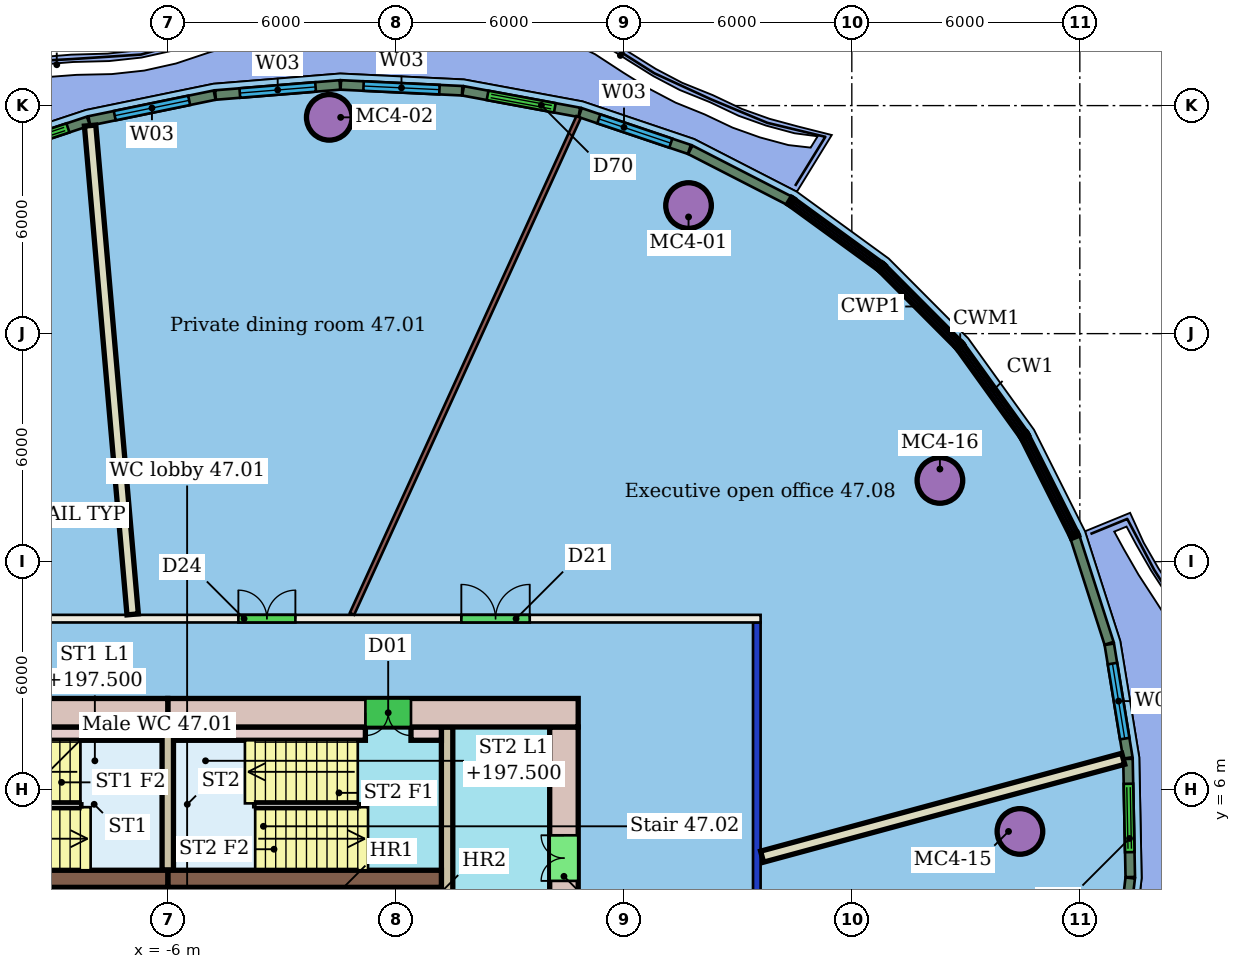
"""IFC4 building model, lengths in metres.
Left out: names, types, materials, properties, quantities, classifications, styles, units other than length and angle.
Written with IfcOpenShell. Run it as: python <this file> out.ifc"""

import sys

from ifc_helpers import new_model, si_unit, direction, frame, frame_2d, origin, origin_2d, place, context, subcontext, project, spatial, rectangle, hollow_circle, extrude, element, fill, save


model = new_model("IFC4")
c1 = context("Model", 3, precision=1e-05, world=origin(), true_north=direction((0.0, 1.0)))
c2 = subcontext(c1, "Body", "Model", "MODEL_VIEW")
j1 = project(units=[si_unit("LENGTHUNIT", "METRE"), si_unit("PLANEANGLEUNIT", "RADIAN")], contexts=[c1])
p1 = place(None, origin())
s1 = spatial("IfcSite", under=j1, at=p1, CompositionType="ELEMENT")
p2 = place(p1, origin())
s2 = spatial("IfcBuilding", under=s1, at=p2, CompositionType="ELEMENT")
p3 = place(p2, frame((0.0, 0.0, 195.7)))
s3 = spatial("IfcBuildingStorey", under=s2, at=p3, CompositionType="ELEMENT", Elevation=195.7)
for number, where, z_axis, x_axis in (
    (1, (7.704, 21.37, 0.0), (0.0, 0.0, 1.0), (1.0, 0.0, 0.0)),
    (2, (-1.75, 23.691, 0.0), (0.0, 0.0, 1.0), (1.0, 0.0, 0.0)),
    (3, (16.424, 4.901, 0.0), (0.0, 0.0, 1.0), (1.0, 0.0, 0.0)),
    (4, (14.318, 14.137, 0.0), (0.0, 0.0, 1.0), (1.0, 0.0, 0.0)),
):
    element("IfcColumn", number, at=place(p3, frame(where, z_axis=z_axis, x_axis=x_axis)), inside=s3, PredefinedType="COLUMN", context=c2, shape_type="SweptSolid", body=[
        extrude(hollow_circle(Radius=0.6, WallThickness=0.045, at=origin_2d()), origin(), (0.0, 0.0, 1.0), 3.45),
    ])
p4 = place(p3, frame((-21.6, 10.5, 0.0), z_axis=(0.0, 0.0, 1.0), x_axis=(1.0, 0.0, 0.0)))
e5 = element("IfcWall", 5, at=p4, inside=s3, PredefinedType="PARTITIONING", context=c2, shape_type="SweptSolid", body=[
    extrude(rectangle(XDim=31.2, YDim=0.2, at=frame_2d((15.6, 0.0))), origin(), (0.0, 0.0, 1.0), 3.45),
])
p5 = place(p4, frame((17.458, 0.0, 0.0)))
e6 = element("IfcOpeningElement", 6, at=p5, cuts=e5, PredefinedType="OPENING", context=c2, shape_type="SweptSolid", body=[
    extrude(rectangle(XDim=1.5, YDim=2.1, at=frame_2d((0.75, 1.05))), frame((0.0, 0.11, 0.0), z_axis=(0.0, -1.0, 0.0), x_axis=(1.0, 0.0, 0.0)), (0.0, 0.0, 1.0), 0.22),
])
p6 = place(p4, frame((8.814, 0.0, 0.0)))
e7 = element("IfcOpeningElement", 7, at=p6, cuts=e5, PredefinedType="OPENING", context=c2, shape_type="SweptSolid", body=[
    extrude(rectangle(XDim=1.8, YDim=2.4, at=frame_2d((0.9, 1.2))), frame((0.0, 0.11, 0.0), z_axis=(0.0, -1.0, 0.0), x_axis=(1.0, 0.0, 0.0)), (0.0, 0.0, 1.0), 0.22),
])
p7 = place(p4, frame((23.325, 0.0, 0.0)))
e8 = element("IfcOpeningElement", 8, at=p7, cuts=e5, PredefinedType="OPENING", context=c2, shape_type="SweptSolid", body=[
    extrude(rectangle(XDim=1.8, YDim=2.1, at=frame_2d((0.9, 1.05))), frame((0.0, 0.11, 0.0), z_axis=(0.0, -1.0, 0.0), x_axis=(1.0, 0.0, 0.0)), (0.0, 0.0, 1.0), 0.22),
])
p8 = place(p3, frame((9.5, 10.4, 0.0), z_axis=(0.0, 0.0, 1.0), x_axis=(0.0, -1.0, 0.0)))
e9 = element("IfcWall", 9, at=p8, inside=s3, PredefinedType="PARTITIONING", context=c2, shape_type="SweptSolid", body=[
    extrude(rectangle(XDim=20.8, YDim=0.2, at=frame_2d((10.4, 0.0))), origin(), (0.0, 0.0, 1.0), 3.05),
])
p9 = place(p8, frame((10.281, 0.0, 0.0)))
e10 = element("IfcOpeningElement", 10, at=p9, cuts=e9, PredefinedType="OPENING", context=c2, shape_type="SweptSolid", body=[
    extrude(rectangle(XDim=1.8, YDim=2.4, at=frame_2d((0.9, 1.2))), frame((0.0, 0.11, 0.0), z_axis=(0.0, -1.0, 0.0), x_axis=(1.0, 0.0, 0.0)), (0.0, 0.0, 1.0), 0.22),
])
p10 = place(p3, frame((4.811, 23.699, 0.0), z_axis=(0.0, 0.0, 1.0), x_axis=(-0.415026400379, -0.909809368488, 0.0)))
e11 = element("IfcWall", 11, at=p10, inside=s3, PredefinedType="PARTITIONING", context=c2, shape_type="SweptSolid", body=[
    extrude(rectangle(XDim=14.369, YDim=0.125, at=frame_2d((7.184, 0.0))), origin(), (0.0, 0.0, 1.0), 3.45),
])
p11 = place(p3, frame((-8.044, 23.474, 0.0), z_axis=(0.0, 0.0, 1.0), x_axis=(0.086744678296, -0.996230576115, 0.0)))
e12 = element("IfcWall", 12, at=p11, inside=s3, PredefinedType="PARTITIONING", context=c2, shape_type="SweptSolid", body=[
    extrude(rectangle(XDim=12.91, YDim=0.3, at=frame_2d((6.455, 0.0))), origin(), (0.0, 0.0, 1.0), 3.45),
])
p12 = place(p3, frame((19.141, 6.812, 0.0), z_axis=(0.0, 0.0, 1.0), x_axis=(-0.965195730249, -0.26152858794, 0.0)))
e13 = element("IfcWall", 13, at=p12, inside=s3, PredefinedType="PARTITIONING", context=c2, shape_type="SweptSolid", body=[
    extrude(rectangle(XDim=9.845, YDim=0.3, at=frame_2d((4.922, 0.0))), origin(), (0.0, 0.0, 1.0), 3.45),
])
p13 = place(p3, frame((10.348, 21.503, 0.0), z_axis=(0.0, 0.0, 1.0), x_axis=(-0.889595471306, 0.456749271955, 0.0)))
e14 = element("IfcWall", 14, at=p13, inside=s3, PredefinedType="SOLIDWALL", context=c2, shape_type="SweptSolid", body=[
    extrude(rectangle(XDim=2.921, YDim=0.25, at=frame_2d((1.46, 0.0))), origin(), (0.0, 0.0, 1.0), 3.1),
])
p14 = place(p3, frame((7.725, 22.847, 0.0), z_axis=(0.0, 0.0, 1.0), x_axis=(-0.947557264869, 0.319586028784, 0.0)))
e15 = element("IfcWall", 15, at=p14, inside=s3, PredefinedType="SOLIDWALL", context=c2, shape_type="SweptSolid", body=[
    extrude(rectangle(XDim=3.03, YDim=0.25, at=frame_2d((1.515, 0.0))), origin(), (0.0, 0.0, 1.0), 3.1),
])
p15 = place(p14, frame((0.515, 0.0, 0.9)))
e16 = element("IfcOpeningElement", 16, at=p15, cuts=e15, PredefinedType="OPENING", context=c2, shape_type="SweptSolid", body=[
    extrude(rectangle(XDim=2.0, YDim=2.1, at=frame_2d((1.0, 1.05))), frame((0.0, 0.135, 0.0), z_axis=(0.0, -1.0, 0.0), x_axis=(1.0, 0.0, 0.0)), (0.0, 0.0, 1.0), 0.27),
])
p16 = place(p3, frame((4.829, 23.822, 0.0), z_axis=(0.0, 0.0, 1.0), x_axis=(-0.98330230245, 0.181979619727, 0.0)))
e17 = element("IfcWall", 17, at=p16, inside=s3, PredefinedType="SOLIDWALL", context=c2, shape_type="SweptSolid", body=[
    extrude(rectangle(XDim=3.11, YDim=0.25, at=frame_2d((1.555, 0.0))), origin(), (0.0, 0.0, 1.0), 3.1),
])
p17 = place(p16, frame((0.655, 0.0, 0.0)))
e18 = element("IfcOpeningElement", 18, at=p17, cuts=e17, PredefinedType="OPENING", context=c2, shape_type="SweptSolid", body=[
    extrude(rectangle(XDim=1.8, YDim=2.4, at=frame_2d((0.9, 1.2))), frame((0.0, 0.135, 0.0), z_axis=(0.0, -1.0, 0.0), x_axis=(1.0, 0.0, 0.0)), (0.0, 0.0, 1.0), 0.27),
])
p18 = place(p3, frame((1.747, 24.391, 0.0), z_axis=(0.0, 0.0, 1.0), x_axis=(-0.998856706074, 0.047804609939, 0.0)))
e19 = element("IfcWall", 19, at=p18, inside=s3, PredefinedType="SOLIDWALL", context=c2, shape_type="SweptSolid", body=[
    extrude(rectangle(XDim=3.197, YDim=0.25, at=frame_2d((1.599, 0.0))), origin(), (0.0, 0.0, 1.0), 3.1),
])
p19 = place(p18, frame((0.598, 0.0, 0.9)))
e20 = element("IfcOpeningElement", 20, at=p19, cuts=e19, PredefinedType="OPENING", context=c2, shape_type="SweptSolid", body=[
    extrude(rectangle(XDim=2.0, YDim=2.1, at=frame_2d((1.0, 1.05))), frame((0.0, 0.135, 0.0), z_axis=(0.0, -1.0, 0.0), x_axis=(1.0, 0.0, 0.0)), (0.0, 0.0, 1.0), 0.27),
])
p20 = place(p3, frame((-1.471, 24.543, 0.0), z_axis=(0.0, 0.0, 1.0), x_axis=(-0.996754245235, -0.080504500529, 0.0)))
e21 = element("IfcWall", 21, at=p20, inside=s3, PredefinedType="SOLIDWALL", context=c2, shape_type="SweptSolid", body=[
    extrude(rectangle(XDim=3.284, YDim=0.25, at=frame_2d((1.642, 0.0))), origin(), (0.0, 0.0, 1.0), 3.1),
])
p21 = place(p20, frame((0.642, 0.0, 0.9)))
e22 = element("IfcOpeningElement", 22, at=p21, cuts=e21, PredefinedType="OPENING", context=c2, shape_type="SweptSolid", body=[
    extrude(rectangle(XDim=2.0, YDim=2.1, at=frame_2d((1.0, 1.05))), frame((0.0, 0.135, 0.0), z_axis=(0.0, -1.0, 0.0), x_axis=(1.0, 0.0, 0.0)), (0.0, 0.0, 1.0), 0.27),
])
p22 = place(p3, frame((-4.767, 24.276, 0.0), z_axis=(0.0, 0.0, 1.0), x_axis=(-0.979500828614, -0.201440131914, 0.0)))
e23 = element("IfcWall", 23, at=p22, inside=s3, PredefinedType="SOLIDWALL", context=c2, shape_type="SweptSolid", body=[
    extrude(rectangle(XDim=3.367, YDim=0.25, at=frame_2d((1.684, 0.0))), origin(), (0.0, 0.0, 1.0), 3.1),
])
p23 = place(p22, frame((0.683, 0.0, 0.9)))
e24 = element("IfcOpeningElement", 24, at=p23, cuts=e23, PredefinedType="OPENING", context=c2, shape_type="SweptSolid", body=[
    extrude(rectangle(XDim=2.0, YDim=2.1, at=frame_2d((1.0, 1.05))), frame((0.0, 0.135, 0.0), z_axis=(0.0, -1.0, 0.0), x_axis=(1.0, 0.0, 0.0)), (0.0, 0.0, 1.0), 0.27),
])
p24 = place(p3, frame((-8.087, 23.592, 0.0), z_axis=(0.0, 0.0, 1.0), x_axis=(-0.949348540896, -0.314224995663, 0.0)))
e25 = element("IfcWall", 25, at=p24, inside=s3, PredefinedType="SOLIDWALL", context=c2, shape_type="SweptSolid", body=[
    extrude(rectangle(XDim=3.439, YDim=0.25, at=frame_2d((1.719, 0.0))), origin(), (0.0, 0.0, 1.0), 3.1),
])
p25 = place(p24, frame((0.569, 0.0, 0.0)))
e26 = element("IfcOpeningElement", 26, at=p25, cuts=e25, PredefinedType="OPENING", context=c2, shape_type="SweptSolid", body=[
    extrude(rectangle(XDim=1.8, YDim=2.4, at=frame_2d((0.9, 1.2))), frame((0.0, 0.135, 0.0), z_axis=(0.0, -1.0, 0.0), x_axis=(1.0, 0.0, 0.0)), (0.0, 0.0, 1.0), 0.27),
])
p26 = place(p3, frame((18.958, 0.501, 0.0), z_axis=(0.0, 0.0, 1.0), x_axis=(0.115316862034, 0.99332875793, 0.0)))
e27 = element("IfcWall", 27, at=p26, inside=s3, PredefinedType="SOLIDWALL", context=c2, shape_type="SweptSolid", body=[
    extrude(rectangle(XDim=3.197, YDim=0.25, at=frame_2d((1.598, 0.0))), origin(), (0.0, 0.0, 1.0), 3.1),
])
p27 = place(p26, frame((0.598, 0.0, 0.9)))
e28 = element("IfcOpeningElement", 28, at=p27, cuts=e27, PredefinedType="OPENING", context=c2, shape_type="SweptSolid", body=[
    extrude(rectangle(XDim=2.0, YDim=2.1, at=frame_2d((1.0, 1.05))), frame((0.0, 0.135, 0.0), z_axis=(0.0, -1.0, 0.0), x_axis=(1.0, 0.0, 0.0)), (0.0, 0.0, 1.0), 0.27),
])
p28 = place(p3, frame((19.327, 3.701, 0.0), z_axis=(0.0, 0.0, 1.0), x_axis=(-0.01970563503, 0.999805825122, 0.0)))
e29 = element("IfcWall", 29, at=p28, inside=s3, PredefinedType="SOLIDWALL", context=c2, shape_type="SweptSolid", body=[
    extrude(rectangle(XDim=3.11, YDim=0.25, at=frame_2d((1.555, 0.0))), origin(), (0.0, 0.0, 1.0), 3.1),
])
p29 = place(p28, frame((0.655, 0.0, 0.0)))
e30 = element("IfcOpeningElement", 30, at=p29, cuts=e29, PredefinedType="OPENING", context=c2, shape_type="SweptSolid", body=[
    extrude(rectangle(XDim=1.8, YDim=2.4, at=frame_2d((0.9, 1.2))), frame((0.0, 0.135, 0.0), z_axis=(0.0, -1.0, 0.0), x_axis=(1.0, 0.0, 0.0)), (0.0, 0.0, 1.0), 0.27),
])
p30 = place(p3, frame((19.264, 6.836, 0.0), z_axis=(0.0, 0.0, 1.0), x_axis=(-0.161248834654, 0.986913782112, 0.0)))
e31 = element("IfcWall", 31, at=p30, inside=s3, PredefinedType="SOLIDWALL", context=c2, shape_type="SweptSolid", body=[
    extrude(rectangle(XDim=3.03, YDim=0.25, at=frame_2d((1.515, 0.0))), origin(), (0.0, 0.0, 1.0), 3.1),
])
p31 = place(p30, frame((0.515, 0.0, 0.9)))
e32 = element("IfcOpeningElement", 32, at=p31, cuts=e31, PredefinedType="OPENING", context=c2, shape_type="SweptSolid", body=[
    extrude(rectangle(XDim=2.0, YDim=2.1, at=frame_2d((1.0, 1.05))), frame((0.0, 0.135, 0.0), z_axis=(0.0, -1.0, 0.0), x_axis=(1.0, 0.0, 0.0)), (0.0, 0.0, 1.0), 0.27),
])
p32 = place(p3, frame((18.769, 9.852, 0.0), z_axis=(0.0, 0.0, 1.0), x_axis=(-0.305979420663, 0.952038126406, 0.0)))
e33 = element("IfcWall", 33, at=p32, inside=s3, PredefinedType="SOLIDWALL", context=c2, shape_type="SweptSolid", body=[
    extrude(rectangle(XDim=2.921, YDim=0.25, at=frame_2d((1.46, 0.0))), origin(), (0.0, 0.0, 1.0), 3.1),
])
p33 = place(p3, frame((4.8, 8.025, 0.0), z_axis=(0.0, 0.0, 1.0), x_axis=(-1.0, 0.0, 0.0)))
e34 = element("IfcWall", 34, at=p33, inside=s3, PredefinedType="SHEAR", context=c2, shape_type="SweptSolid", body=[
    extrude(rectangle(XDim=10.8, YDim=0.75, at=frame_2d((5.4, 0.0))), origin(), (0.0, 0.0, 1.0), 3.3),
])
p34 = place(p33, frame((4.4, 0.0, 0.0)))
e35 = element("IfcOpeningElement", 35, at=p34, cuts=e34, PredefinedType="OPENING", context=c2, shape_type="SweptSolid", body=[
    extrude(rectangle(XDim=1.2, YDim=2.1, at=frame_2d((0.6, 1.05))), frame((0.0, 0.385, 0.0), z_axis=(0.0, -1.0, 0.0), x_axis=(1.0, 0.0, 0.0)), (0.0, 0.0, 1.0), 0.77),
])
p35 = place(p3, frame((-6.0, 8.025, 0.0), z_axis=(0.0, 0.0, 1.0), x_axis=(-1.0, 0.0, 0.0)))
e36 = element("IfcWall", 36, at=p35, inside=s3, PredefinedType="SHEAR", context=c2, shape_type="SweptSolid", body=[
    extrude(rectangle(XDim=10.8, YDim=0.75, at=frame_2d((5.4, 0.0))), origin(), (0.0, 0.0, 1.0), 3.3),
])
p36 = place(p35, frame((5.2, 0.0, 0.0)))
e37 = element("IfcOpeningElement", 37, at=p36, cuts=e36, PredefinedType="OPENING", context=c2, shape_type="SweptSolid", body=[
    extrude(rectangle(XDim=1.2, YDim=2.1, at=frame_2d((0.6, 1.05))), frame((0.0, 0.385, 0.0), z_axis=(0.0, -1.0, 0.0), x_axis=(1.0, 0.0, 0.0)), (0.0, 0.0, 1.0), 0.77),
])
p37 = place(p3, frame((4.425, -7.65, 0.0), z_axis=(0.0, 0.0, 1.0), x_axis=(0.0, 1.0, 0.0)))
e38 = element("IfcWall", 38, at=p37, inside=s3, PredefinedType="SHEAR", context=c2, shape_type="SweptSolid", body=[
    extrude(rectangle(XDim=15.3, YDim=0.75, at=frame_2d((7.65, 0.0))), origin(), (0.0, 0.0, 1.0), 3.3),
])
p38 = place(p37, frame((2.85, 0.0, 0.0)))
e39 = element("IfcOpeningElement", 39, at=p38, cuts=e38, PredefinedType="OPENING", context=c2, shape_type="SweptSolid", body=[
    extrude(rectangle(XDim=1.2, YDim=2.1, at=frame_2d((0.6, 1.05))), frame((0.0, 0.385, 0.0), z_axis=(0.0, -1.0, 0.0), x_axis=(1.0, 0.0, 0.0)), (0.0, 0.0, 1.0), 0.77),
])
p39 = place(p37, frame((11.25, 0.0, 0.0)))
e40 = element("IfcOpeningElement", 40, at=p39, cuts=e38, PredefinedType="OPENING", context=c2, shape_type="SweptSolid", body=[
    extrude(rectangle(XDim=1.2, YDim=2.1, at=frame_2d((0.6, 1.05))), frame((0.0, 0.385, 0.0), z_axis=(0.0, -1.0, 0.0), x_axis=(1.0, 0.0, 0.0)), (0.0, 0.0, 1.0), 0.77),
])
for number, where, z_axis, x_axis in (
    (41, (-13.2, 3.655, 0.0), (0.0, 0.0, 1.0), (1.0, 0.0, 0.0)),
    (42, (-6.0, 3.655, 0.0), (0.0, 0.0, 1.0), (1.0, 0.0, 0.0)),
):
    element("IfcWall", number, at=place(p3, frame(where, z_axis=z_axis, x_axis=x_axis)), inside=s3, PredefinedType="SHEAR", context=c2, shape_type="SweptSolid", body=[
        extrude(rectangle(XDim=7.2, YDim=0.45, at=frame_2d((3.6, 0.0))), origin(), (0.0, 0.0, 1.0), 3.3),
    ])
p40 = place(p3, frame((1.35, -7.65, 0.0), z_axis=(0.0, 0.0, 1.0), x_axis=(0.0, 1.0, 0.0)))
e43 = element("IfcWall", 43, at=p40, inside=s3, PredefinedType="SHEAR", context=c2, shape_type="SweptSolid", body=[
    extrude(rectangle(XDim=15.3, YDim=0.3, at=frame_2d((7.65, 0.0))), origin(), (0.0, 0.0, 1.0), 3.3),
])
p41 = place(p40, frame((1.56, 0.0, 0.0)))
e44 = element("IfcOpeningElement", 44, at=p41, cuts=e43, PredefinedType="OPENING", context=c2, shape_type="SweptSolid", body=[
    extrude(rectangle(XDim=1.0, YDim=2.1, at=frame_2d((0.5, 1.05))), frame((0.0, 0.16, 0.0), z_axis=(0.0, -1.0, 0.0), x_axis=(1.0, 0.0, 0.0)), (0.0, 0.0, 1.0), 0.32),
])
p42 = place(p40, frame((6.9, 0.0, 0.0)))
e45 = element("IfcOpeningElement", 45, at=p42, cuts=e43, PredefinedType="OPENING", context=c2, shape_type="SweptSolid", body=[
    extrude(rectangle(XDim=1.5, YDim=2.1, at=frame_2d((0.75, 1.05))), frame((0.0, 0.16, 0.0), z_axis=(0.0, -1.0, 0.0), x_axis=(1.0, 0.0, 0.0)), (0.0, 0.0, 1.0), 0.32),
])
p43 = place(p3, frame((-6.0, 3.88, 0.0), z_axis=(0.0, 0.0, 1.0), x_axis=(0.0, 1.0, 0.0)))
e46 = element("IfcWall", 46, at=p43, inside=s3, PredefinedType="SHEAR", context=c2, shape_type="SweptSolid", body=[
    extrude(rectangle(XDim=3.77, YDim=0.3, at=frame_2d((1.885, 0.0))), origin(), (0.0, 0.0, 1.0), 3.3),
])
for number, where, z_axis, x_axis in (
    (47, (-11.2, 7.475, 0.0), (0.0, 0.0, 1.0), (1.0, 0.0, 0.0)),
    (48, (-5.85, 7.475, 0.0), (0.0, 0.0, 1.0), (1.0, 0.0, 0.0)),
):
    element("IfcWall", number, at=place(p3, frame(where, z_axis=z_axis, x_axis=x_axis)), inside=s3, PredefinedType="SHEAR", context=c2, shape_type="SweptSolid", body=[
        extrude(rectangle(XDim=5.05, YDim=0.35, at=frame_2d((2.525, 0.0))), origin(), (0.0, 0.0, 1.0), 3.3),
    ])
p44 = place(p3, frame((0.4, 7.475, 0.0), z_axis=(0.0, 0.0, 1.0), x_axis=(1.0, 0.0, 0.0)))
e49 = element("IfcWall", 49, at=p44, inside=s3, PredefinedType="SHEAR", context=c2, shape_type="SweptSolid", body=[
    extrude(rectangle(XDim=0.8, YDim=0.35, at=frame_2d((0.4, 0.0))), origin(), (0.0, 0.0, 1.0), 3.3),
])
for number, where, z_axis, x_axis in (
    (50, (-3.558, 1.6, 0.0), (0.0, 0.0, 1.0), (0.0, 1.0, 0.0)),
    (51, (-1.117, 1.6, 0.0), (0.0, 0.0, 1.0), (0.0, 1.0, 0.0)),
):
    element("IfcWall", number, at=place(p3, frame(where, z_axis=z_axis, x_axis=x_axis)), inside=s3, PredefinedType="SHEAR", context=c2, shape_type="SweptSolid", body=[
        extrude(rectangle(XDim=1.83, YDim=0.25, at=frame_2d((0.915, 0.0))), origin(), (0.0, 0.0, 1.0), 3.3),
    ])
p45 = place(p3, frame((-5.967, 1.6, 0.0), z_axis=(0.0, 0.0, 1.0), x_axis=(0.0, 1.0, 0.0)))
e52 = element("IfcWall", 52, at=p45, inside=s3, PredefinedType="PARTITIONING", context=c2, shape_type="SweptSolid", body=[
    extrude(rectangle(XDim=1.83, YDim=0.15, at=frame_2d((0.915, 0.0))), origin(), (0.0, 0.0, 1.0), 3.3),
])
p46 = place(p5, origin())
e53 = element("IfcDoor", 53, at=p46, inside=s3, OperationType="DOUBLE_DOOR_SINGLE_SWING", PredefinedType="DOOR", context=c2, shape_type="SweptSolid", body=[
    extrude(rectangle(XDim=1.5, YDim=2.1, at=frame_2d((0.75, 1.05))), frame((0.0, 0.025, 0.0), z_axis=(0.0, -1.0, 0.0), x_axis=(1.0, 0.0, 0.0)), (0.0, 0.0, 1.0), 0.05),
])
fill(e6, e53)
p47 = place(p7, origin())
e54 = element("IfcDoor", 54, at=p47, inside=s3, OperationType="DOUBLE_DOOR_SINGLE_SWING", PredefinedType="DOOR", context=c2, shape_type="SweptSolid", body=[
    extrude(rectangle(XDim=1.8, YDim=2.1, at=frame_2d((0.9, 1.05))), frame((0.0, 0.025, 0.0), z_axis=(0.0, -1.0, 0.0), x_axis=(1.0, 0.0, 0.0)), (0.0, 0.0, 1.0), 0.05),
])
fill(e8, e54)
p48 = place(p15, origin())
e55 = element("IfcWindow", 55, at=p48, inside=s3, PartitioningType="SINGLE_PANEL", PredefinedType="WINDOW", context=c2, shape_type="SweptSolid", body=[
    extrude(rectangle(XDim=2.0, YDim=2.1, at=frame_2d((1.0, 1.05))), frame((0.0, 0.03, 0.0), z_axis=(0.0, -1.0, 0.0), x_axis=(1.0, 0.0, 0.0)), (0.0, 0.0, 1.0), 0.06),
])
fill(e16, e55)
p49 = place(p17, origin())
e56 = element("IfcDoor", 56, at=p49, inside=s3, OperationType="DOUBLE_DOOR_SLIDING", PredefinedType="DOOR", context=c2, shape_type="SweptSolid", body=[
    extrude(rectangle(XDim=1.8, YDim=2.4, at=frame_2d((0.9, 1.2))), frame((0.0, 0.025, 0.0), z_axis=(0.0, -1.0, 0.0), x_axis=(1.0, 0.0, 0.0)), (0.0, 0.0, 1.0), 0.05),
])
fill(e18, e56)
p50 = place(p19, origin())
e57 = element("IfcWindow", 57, at=p50, inside=s3, PartitioningType="SINGLE_PANEL", PredefinedType="WINDOW", context=c2, shape_type="SweptSolid", body=[
    extrude(rectangle(XDim=2.0, YDim=2.1, at=frame_2d((1.0, 1.05))), frame((0.0, 0.03, 0.0), z_axis=(0.0, -1.0, 0.0), x_axis=(1.0, 0.0, 0.0)), (0.0, 0.0, 1.0), 0.06),
])
fill(e20, e57)
p51 = place(p21, origin())
e58 = element("IfcWindow", 58, at=p51, inside=s3, PartitioningType="SINGLE_PANEL", PredefinedType="WINDOW", context=c2, shape_type="SweptSolid", body=[
    extrude(rectangle(XDim=2.0, YDim=2.1, at=frame_2d((1.0, 1.05))), frame((0.0, 0.03, 0.0), z_axis=(0.0, -1.0, 0.0), x_axis=(1.0, 0.0, 0.0)), (0.0, 0.0, 1.0), 0.06),
])
fill(e22, e58)
p52 = place(p23, origin())
e59 = element("IfcWindow", 59, at=p52, inside=s3, PartitioningType="SINGLE_PANEL", PredefinedType="WINDOW", context=c2, shape_type="SweptSolid", body=[
    extrude(rectangle(XDim=2.0, YDim=2.1, at=frame_2d((1.0, 1.05))), frame((0.0, 0.03, 0.0), z_axis=(0.0, -1.0, 0.0), x_axis=(1.0, 0.0, 0.0)), (0.0, 0.0, 1.0), 0.06),
])
fill(e24, e59)
p53 = place(p25, origin())
e60 = element("IfcDoor", 60, at=p53, inside=s3, OperationType="DOUBLE_DOOR_SLIDING", PredefinedType="DOOR", context=c2, shape_type="SweptSolid", body=[
    extrude(rectangle(XDim=1.8, YDim=2.4, at=frame_2d((0.9, 1.2))), frame((0.0, 0.025, 0.0), z_axis=(0.0, -1.0, 0.0), x_axis=(1.0, 0.0, 0.0)), (0.0, 0.0, 1.0), 0.05),
])
fill(e26, e60)
p54 = place(p29, origin())
e61 = element("IfcDoor", 61, at=p54, inside=s3, OperationType="DOUBLE_DOOR_SLIDING", PredefinedType="DOOR", context=c2, shape_type="SweptSolid", body=[
    extrude(rectangle(XDim=1.8, YDim=2.4, at=frame_2d((0.9, 1.2))), frame((0.0, 0.025, 0.0), z_axis=(0.0, -1.0, 0.0), x_axis=(1.0, 0.0, 0.0)), (0.0, 0.0, 1.0), 0.05),
])
fill(e30, e61)
p55 = place(p31, origin())
e62 = element("IfcWindow", 62, at=p55, inside=s3, PartitioningType="SINGLE_PANEL", PredefinedType="WINDOW", context=c2, shape_type="SweptSolid", body=[
    extrude(rectangle(XDim=2.0, YDim=2.1, at=frame_2d((1.0, 1.05))), frame((0.0, 0.03, 0.0), z_axis=(0.0, -1.0, 0.0), x_axis=(1.0, 0.0, 0.0)), (0.0, 0.0, 1.0), 0.06),
])
fill(e32, e62)
p56 = place(p34, origin())
e63 = element("IfcDoor", 63, at=p56, inside=s3, OperationType="DOUBLE_DOOR_SINGLE_SWING", PredefinedType="NOTDEFINED", context=c2, shape_type="SweptSolid", body=[
    extrude(rectangle(XDim=1.2, YDim=2.1, at=frame_2d((0.6, 1.05))), frame((0.0, 0.025, 0.0), z_axis=(0.0, -1.0, 0.0), x_axis=(1.0, 0.0, 0.0)), (0.0, 0.0, 1.0), 0.05),
])
fill(e35, e63)
p57 = place(p39, origin())
e64 = element("IfcDoor", 64, at=p57, inside=s3, OperationType="DOUBLE_DOOR_SINGLE_SWING", PredefinedType="NOTDEFINED", context=c2, shape_type="SweptSolid", body=[
    extrude(rectangle(XDim=1.2, YDim=2.1, at=frame_2d((0.6, 1.05))), frame((0.0, 0.025, 0.0), z_axis=(0.0, -1.0, 0.0), x_axis=(1.0, 0.0, 0.0)), (0.0, 0.0, 1.0), 0.05),
])
fill(e40, e64)
save(model, sys.argv[1])
